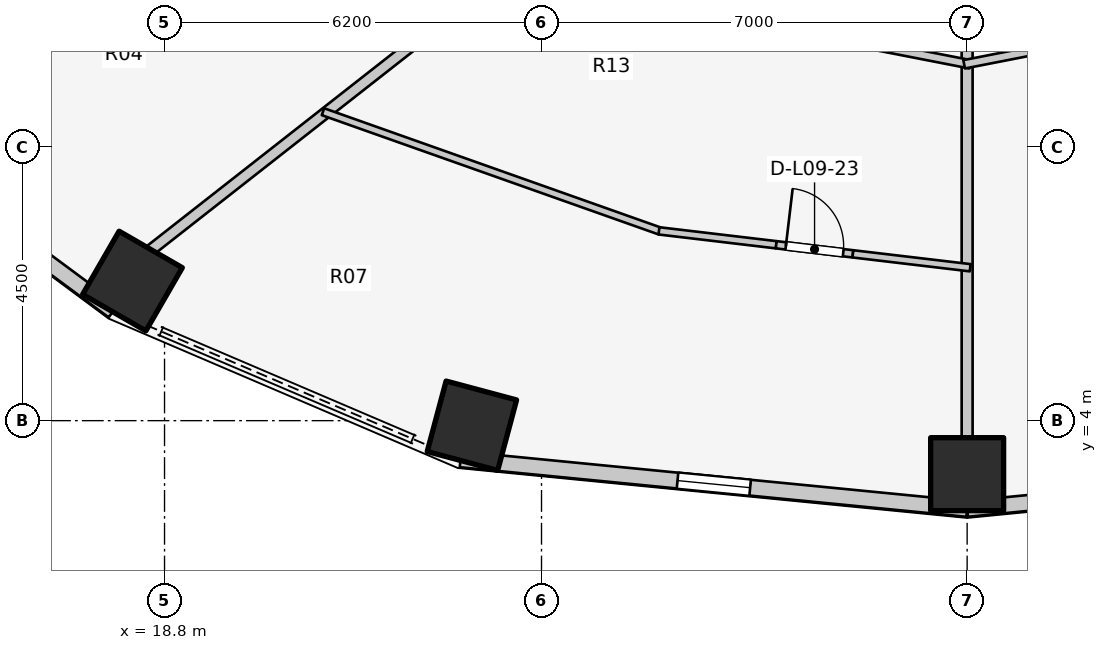
"""IFC4 building model, lengths in metres.
Left out: names, types, materials, properties, quantities, classifications, styles, units other than length and angle.
Written with IfcOpenShell. Run it as: python <this file> out.ifc"""

import sys

from ifc_helpers import new_model, si_unit, direction, frame, frame_2d, origin, origin_2d, place, context, subcontext, project, spatial, rectangle, extrude, element, fill, save


model = new_model("IFC4")
c1 = context("Model", 3, precision=1e-05, world=origin(), true_north=direction((0.0, 1.0)))
c2 = subcontext(c1, "Body", "Model", "MODEL_VIEW")
j1 = project(units=[si_unit("LENGTHUNIT", "METRE"), si_unit("PLANEANGLEUNIT", "RADIAN")], contexts=[c1])
p1 = place(None, origin())
s1 = spatial("IfcSite", under=j1, at=p1, CompositionType="ELEMENT")
p2 = place(p1, origin())
s2 = spatial("IfcBuilding", under=s1, at=p2, CompositionType="ELEMENT")
p3 = place(p2, frame((0.0, 0.0, 33.8)))
s3 = spatial("IfcBuildingStorey", under=s2, at=p3, CompositionType="ELEMENT", Elevation=33.8)
for number, where, z_axis, x_axis in (
    (1, (18.273, 6.296, 0.0), (0.0, 0.0, 1.0), (-0.5, -0.866, 0.0)),
    (2, (23.855, 3.916, 0.0), (0.0, 0.0, 1.0), (-0.259, -0.966, 0.0)),
    (3, (32.0, 3.12, 0.0), (0.0, 0.0, 1.0), (0.0, -1.0, 0.0)),
):
    element("IfcColumn", number, at=place(p3, frame(where, z_axis=z_axis, x_axis=x_axis)), inside=s3, PredefinedType="COLUMN", context=c2, shape_type="SweptSolid", body=[
        extrude(rectangle(XDim=1.2, YDim=1.2, at=origin_2d()), origin(), (0.0, 0.0, 1.0), 3.1),
    ])
p4 = place(p3, frame((13.595, 9.035, 0.0), z_axis=(0.0, 0.0, 1.0), x_axis=(0.803477531792, -0.595335078679, 0.0)))
e4 = element("IfcWall", 4, at=p4, inside=s3, PredefinedType="STANDARD", context=c2, shape_type="SweptSolid", body=[
    extrude(rectangle(XDim=5.43, YDim=0.26, at=frame_2d((2.715, 0.0))), origin(), (0.0, 0.0, 1.0), 1.22),
])
p5 = place(p3, frame((23.668, 3.364, 0.0), z_axis=(0.0, 0.0, 1.0), x_axis=(0.995247718352, -0.097375454379, 0.0)))
e5 = element("IfcWall", 5, at=p5, inside=s3, PredefinedType="STANDARD", context=c2, shape_type="SweptSolid", body=[
    extrude(rectangle(XDim=8.372, YDim=0.26, at=frame_2d((4.186, 0.0))), origin(), (0.0, 0.0, 1.0), 1.22),
])
p6 = place(p5, frame((3.586, 0.0, 0.15)))
e6 = element("IfcOpeningElement", 6, at=p6, cuts=e5, PredefinedType="OPENING", context=c2, shape_type="SweptSolid", body=[
    extrude(rectangle(XDim=1.2, YDim=0.9, at=frame_2d((0.6, 0.45))), frame((0.0, 0.14, 0.0), z_axis=(0.0, -1.0, 0.0), x_axis=(1.0, 0.0, 0.0)), (0.0, 0.0, 1.0), 0.28),
])
p7 = place(p3, frame((32.0, 2.549, 0.0), z_axis=(0.0, 0.0, 1.0), x_axis=(0.995247718352, 0.097375454379, 0.0)))
e7 = element("IfcWall", 7, at=p7, inside=s3, PredefinedType="STANDARD", context=c2, shape_type="SweptSolid", body=[
    extrude(rectangle(XDim=8.372, YDim=0.26, at=frame_2d((4.186, 0.0))), origin(), (0.0, 0.0, 1.0), 1.22),
])
p8 = place(p7, frame((3.586, 0.0, 0.15)))
e8 = element("IfcOpeningElement", 8, at=p8, cuts=e7, PredefinedType="OPENING", context=c2, shape_type="SweptSolid", body=[
    extrude(rectangle(XDim=1.2, YDim=0.9, at=frame_2d((0.6, 0.45))), frame((0.0, 0.14, 0.0), z_axis=(0.0, -1.0, 0.0), x_axis=(1.0, 0.0, 0.0)), (0.0, 0.0, 1.0), 0.28),
])
p9 = place(p3, frame((26.892, 13.327, 0.0), z_axis=(0.0, 0.0, 1.0), x_axis=(-0.78700868866, -0.616941912966, 0.0)))
e9 = element("IfcWall", 9, at=p9, inside=s3, PredefinedType="PARTITIONING", context=c2, shape_type="SweptSolid", body=[
    extrude(rectangle(XDim=10.583, YDim=0.18, at=frame_2d((5.292, 0.0))), origin(), (0.0, 0.0, 1.0), 1.22),
])
p10 = place(p3, frame((32.0, 11.815, 0.0), z_axis=(0.0, 0.0, 1.0), x_axis=(0.0, -1.0, 0.0)))
e10 = element("IfcWall", 10, at=p10, inside=s3, PredefinedType="PARTITIONING", context=c2, shape_type="SweptSolid", body=[
    extrude(rectangle(XDim=8.115, YDim=0.18, at=frame_2d((4.058, 0.0))), origin(), (0.0, 0.0, 1.0), 1.22),
])
p11 = place(p3, frame((21.406, 9.081, 0.0), z_axis=(0.0, 0.0, 1.0), x_axis=(0.942625048334, -0.333853288517, 0.0)))
e11 = element("IfcWall", 11, at=p11, inside=s3, PredefinedType="MOVABLE", context=c2, shape_type="SweptSolid", body=[
    extrude(rectangle(XDim=5.882, YDim=0.12, at=frame_2d((2.941, 0.0))), origin(), (0.0, 0.0, 1.0), 1.22),
])
p12 = place(p3, frame((26.932, 7.121, 0.0), z_axis=(0.0, 0.0, 1.0), x_axis=(0.993052427277, -0.117672752492, 0.0)))
e12 = element("IfcWall", 12, at=p12, inside=s3, PredefinedType="MOVABLE", context=c2, shape_type="SweptSolid", body=[
    extrude(rectangle(XDim=1.942, YDim=0.12, at=frame_2d((0.971, 0.0))), origin(), (0.0, 0.0, 1.0), 2.575),
])
p13 = place(p3, frame((28.86, 6.893, 0.0), z_axis=(0.0, 0.0, 1.0), x_axis=(0.993055805273, -0.11764424174, 0.0)))
e13 = element("IfcWall", 13, at=p13, inside=s3, PredefinedType="MOVABLE", context=c2, shape_type="SweptSolid", body=[
    extrude(rectangle(XDim=1.27, YDim=0.12, at=frame_2d((0.635, 0.0))), origin(), (0.0, 0.0, 1.0), 2.575),
])
p14 = place(p13, frame((0.16, 0.0, 0.0)))
e14 = element("IfcOpeningElement", 14, at=p14, cuts=e13, PredefinedType="OPENING", context=c2, shape_type="SweptSolid", body=[
    extrude(rectangle(XDim=0.95, YDim=2.1, at=frame_2d((0.475, 1.05))), frame((0.0, 0.07, 0.0), z_axis=(0.0, -1.0, 0.0), x_axis=(1.0, 0.0, 0.0)), (0.0, 0.0, 1.0), 0.14),
])
p15 = place(p3, frame((30.121, 6.743, 0.0), z_axis=(0.0, 0.0, 1.0), x_axis=(0.993052427277, -0.117672752492, 0.0)))
e15 = element("IfcWall", 15, at=p15, inside=s3, PredefinedType="MOVABLE", context=c2, shape_type="SweptSolid", body=[
    extrude(rectangle(XDim=1.942, YDim=0.12, at=frame_2d((0.971, 0.0))), origin(), (0.0, 0.0, 1.0), 1.22),
])
p16 = place(p3, frame((29.522, 10.354, 0.0), z_axis=(0.0, 0.0, 1.0), x_axis=(0.981455717174, -0.191689006535, 0.0)))
e16 = element("IfcWall", 16, at=p16, inside=s3, PredefinedType="PLUMBINGWALL", context=c2, shape_type="SweptSolid", body=[
    extrude(rectangle(XDim=1.22, YDim=0.14, at=frame_2d((0.61, 0.0))), origin(), (0.0, 0.0, 1.0), 2.575),
])
p17 = place(p16, frame((0.16, 0.0, 0.0)))
e17 = element("IfcOpeningElement", 17, at=p17, cuts=e16, PredefinedType="OPENING", context=c2, shape_type="SweptSolid", body=[
    extrude(rectangle(XDim=0.9, YDim=2.1, at=frame_2d((0.45, 1.05))), frame((0.0, 0.08, 0.0), z_axis=(0.0, -1.0, 0.0), x_axis=(1.0, 0.0, 0.0)), (0.0, 0.0, 1.0), 0.16),
])
p18 = place(p3, frame((30.719, 10.12, 0.0), z_axis=(0.0, 0.0, 1.0), x_axis=(0.981450920641, -0.191713563349, 0.0)))
e18 = element("IfcWall", 18, at=p18, inside=s3, PredefinedType="PLUMBINGWALL", context=c2, shape_type="SweptSolid", body=[
    extrude(rectangle(XDim=1.355, YDim=0.14, at=frame_2d((0.677, 0.0))), origin(), (0.0, 0.0, 1.0), 1.22),
])
p19 = place(p3, frame((31.951, 9.86, 0.0), z_axis=(0.0, 0.0, 1.0), x_axis=(0.981457541308, 0.191679666658, 0.0)))
e19 = element("IfcWall", 19, at=p19, inside=s3, PredefinedType="PLUMBINGWALL", context=c2, shape_type="SweptSolid", body=[
    extrude(rectangle(XDim=1.355, YDim=0.14, at=frame_2d((0.678, 0.0))), origin(), (0.0, 0.0, 1.0), 1.22),
])
p20 = place(p6, origin())
e20 = element("IfcWindow", 20, at=p20, inside=s3, PartitioningType="SINGLE_PANEL", PredefinedType="WINDOW", context=c2, shape_type="SweptSolid", body=[
    extrude(rectangle(XDim=1.2, YDim=0.9, at=frame_2d((0.6, 0.45))), frame((0.0, 0.03, 0.0), z_axis=(0.0, -1.0, 0.0), x_axis=(1.0, 0.0, 0.0)), (0.0, 0.0, 1.0), 0.06),
])
fill(e6, e20)
p21 = place(p14, origin())
e21 = element("IfcDoor", 21, at=p21, inside=s3, OperationType="SINGLE_SWING_LEFT", PredefinedType="DOOR", context=c2, shape_type="SweptSolid", body=[
    extrude(rectangle(XDim=0.95, YDim=2.1, at=frame_2d((0.475, 1.05))), frame((0.0, 0.025, 0.0), z_axis=(0.0, -1.0, 0.0), x_axis=(1.0, 0.0, 0.0)), (0.0, 0.0, 1.0), 0.05),
])
fill(e14, e21)
save(model, sys.argv[1])
